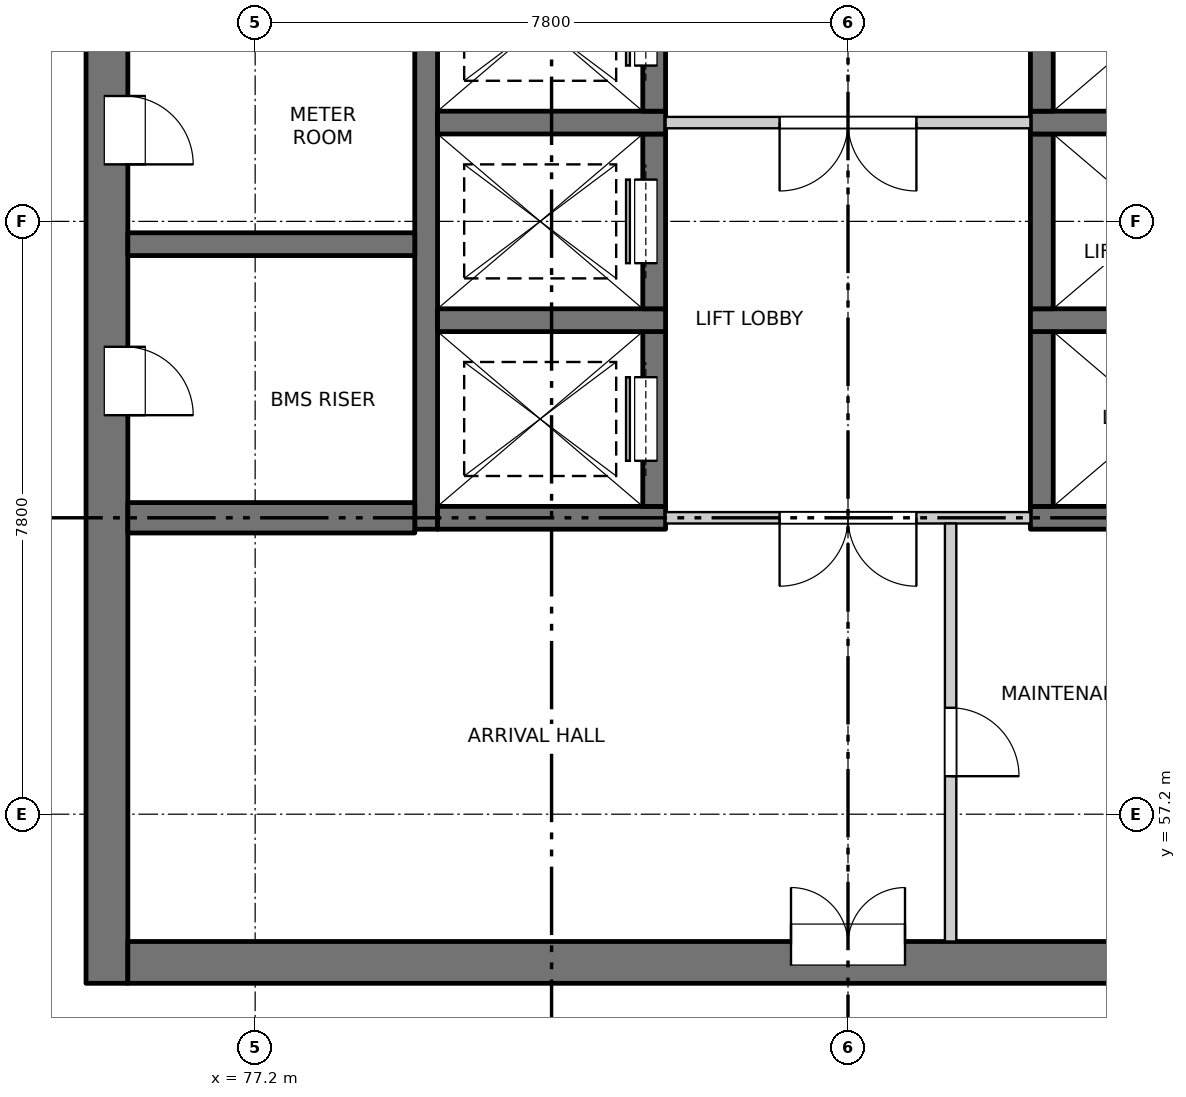
"""IFC4 building model, lengths in metres.
Left out: names, types, materials, properties, quantities, classifications, styles, units other than length and angle.
Written with IfcOpenShell. Run it as: python <this file> out.ifc"""

import sys

from ifc_helpers import new_model, si_unit, direction, frame, frame_2d, origin, place, context, subcontext, project, spatial, rectangle, extrude, element, fill, save


model = new_model("IFC4")
c1 = context("Model", 3, precision=1e-05, world=origin(), true_north=direction((0.0, 1.0)))
c2 = subcontext(c1, "Body", "Model", "MODEL_VIEW")
j1 = project(units=[si_unit("LENGTHUNIT", "METRE"), si_unit("PLANEANGLEUNIT", "RADIAN")], contexts=[c1])
p1 = place(None, origin())
s1 = spatial("IfcSite", under=j1, at=p1, CompositionType="ELEMENT")
p2 = place(p1, origin())
s2 = spatial("IfcBuilding", under=s1, at=p2, CompositionType="ELEMENT")
p3 = place(p2, frame((0.0, 0.0, 127.1)))
s3 = spatial("IfcBuildingStorey", under=s2, at=p3, CompositionType="ELEMENT", Elevation=127.1)
p4 = place(p3, frame((75.25, 54.975, -0.25), z_axis=(0.0, 0.0, 1.0), x_axis=(0.0, 1.0, 0.0)))
e1 = element("IfcWall", 1, at=p4, inside=s3, PredefinedType="SOLIDWALL", context=c2, shape_type="SweptSolid", body=[
    extrude(rectangle(XDim=22.325, YDim=0.55, at=frame_2d((11.163, 0.0))), origin(), (0.0, 0.0, 1.0), 3.4),
])
p5 = place(p4, frame((7.475, 0.0, 0.25)))
e2 = element("IfcOpeningElement", 2, at=p5, cuts=e1, PredefinedType="OPENING", context=c2, shape_type="SweptSolid", body=[
    extrude(rectangle(XDim=0.9, YDim=2.1, at=frame_2d((0.45, 1.05))), frame((0.0, 0.285, 0.0), z_axis=(0.0, -1.0, 0.0), x_axis=(1.0, 0.0, 0.0)), (0.0, 0.0, 1.0), 0.57),
])
p6 = place(p4, frame((10.775, 0.0, 0.25)))
e3 = element("IfcOpeningElement", 3, at=p6, cuts=e1, PredefinedType="OPENING", context=c2, shape_type="SweptSolid", body=[
    extrude(rectangle(XDim=0.9, YDim=2.1, at=frame_2d((0.45, 1.05))), frame((0.0, 0.285, 0.0), z_axis=(0.0, -1.0, 0.0), x_axis=(1.0, 0.0, 0.0)), (0.0, 0.0, 1.0), 0.57),
])
p7 = place(p4, frame((13.775, 0.0, 0.25)))
e4 = element("IfcOpeningElement", 4, at=p7, cuts=e1, PredefinedType="OPENING", context=c2, shape_type="SweptSolid", body=[
    extrude(rectangle(XDim=0.9, YDim=2.1, at=frame_2d((0.45, 1.05))), frame((0.0, 0.285, 0.0), z_axis=(0.0, -1.0, 0.0), x_axis=(1.0, 0.0, 0.0)), (0.0, 0.0, 1.0), 0.57),
])
p8 = place(p4, frame((16.775, 0.0, 0.25)))
e5 = element("IfcOpeningElement", 5, at=p8, cuts=e1, PredefinedType="OPENING", context=c2, shape_type="SweptSolid", body=[
    extrude(rectangle(XDim=0.9, YDim=2.1, at=frame_2d((0.45, 1.05))), frame((0.0, 0.285, 0.0), z_axis=(0.0, -1.0, 0.0), x_axis=(1.0, 0.0, 0.0)), (0.0, 0.0, 1.0), 0.57),
])
p9 = place(p4, frame((20.075, 0.0, 0.25)))
e6 = element("IfcOpeningElement", 6, at=p9, cuts=e1, PredefinedType="OPENING", context=c2, shape_type="SweptSolid", body=[
    extrude(rectangle(XDim=0.9, YDim=2.1, at=frame_2d((0.45, 1.05))), frame((0.0, 0.285, 0.0), z_axis=(0.0, -1.0, 0.0), x_axis=(1.0, 0.0, 0.0)), (0.0, 0.0, 1.0), 0.57),
])
p10 = place(p3, frame((75.525, 55.25, -0.25), z_axis=(0.0, 0.0, 1.0), x_axis=(1.0, 0.0, 0.0)))
e7 = element("IfcWall", 7, at=p10, inside=s3, PredefinedType="SOLIDWALL", context=c2, shape_type="SweptSolid", body=[
    extrude(rectangle(XDim=18.95, YDim=0.55, at=frame_2d((9.475, 0.0))), origin(), (0.0, 0.0, 1.0), 3.4),
])
p11 = place(p10, frame((8.725, 0.0, 0.25)))
e8 = element("IfcOpeningElement", 8, at=p11, cuts=e7, PredefinedType="OPENING", context=c2, shape_type="SweptSolid", body=[
    extrude(rectangle(XDim=1.5, YDim=2.1, at=frame_2d((0.75, 1.05))), frame((0.0, 0.285, 0.0), z_axis=(0.0, -1.0, 0.0), x_axis=(1.0, 0.0, 0.0)), (0.0, 0.0, 1.0), 0.57),
])
p12 = place(p3, frame((79.45, 60.95, -0.25), z_axis=(0.0, 0.0, 1.0), x_axis=(0.0, 1.0, 0.0)))
e9 = element("IfcWall", 9, at=p12, inside=s3, PredefinedType="SOLIDWALL", context=c2, shape_type="SweptSolid", body=[
    extrude(rectangle(XDim=16.35, YDim=0.3, at=frame_2d((8.175, 0.0))), origin(), (0.0, 0.0, 1.0), 3.4),
])
p13 = place(p3, frame((79.6, 61.1, -0.25), z_axis=(0.0, 0.0, 1.0), x_axis=(1.0, 0.0, 0.0)))
e10 = element("IfcWall", 10, at=p13, inside=s3, PredefinedType="SOLIDWALL", context=c2, shape_type="SweptSolid", body=[
    extrude(rectangle(XDim=3.0, YDim=0.3, at=frame_2d((1.5, 0.0))), origin(), (0.0, 0.0, 1.0), 3.4),
])
p14 = place(p3, frame((82.45, 61.25, -0.25), z_axis=(0.0, 0.0, 1.0), x_axis=(0.0, 1.0, 0.0)))
e11 = element("IfcWall", 11, at=p14, inside=s3, PredefinedType="SOLIDWALL", context=c2, shape_type="SweptSolid", body=[
    extrude(rectangle(XDim=2.3, YDim=0.3, at=frame_2d((1.15, 0.0))), origin(), (0.0, 0.0, 1.0), 3.4),
])
p15 = place(p14, frame((0.6, 0.0, 0.25)))
e12 = element("IfcOpeningElement", 12, at=p15, cuts=e11, PredefinedType="OPENING", context=c2, shape_type="SweptSolid", body=[
    extrude(rectangle(XDim=1.1, YDim=2.1, at=frame_2d((0.55, 1.05))), frame((0.0, 0.16, 0.0), z_axis=(0.0, -1.0, 0.0), x_axis=(1.0, 0.0, 0.0)), (0.0, 0.0, 1.0), 0.32),
])
p16 = place(p3, frame((79.6, 63.7, -0.25), z_axis=(0.0, 0.0, 1.0), x_axis=(1.0, 0.0, 0.0)))
e13 = element("IfcWall", 13, at=p16, inside=s3, PredefinedType="SOLIDWALL", context=c2, shape_type="SweptSolid", body=[
    extrude(rectangle(XDim=3.0, YDim=0.3, at=frame_2d((1.5, 0.0))), origin(), (0.0, 0.0, 1.0), 3.4),
])
p17 = place(p3, frame((82.45, 63.85, -0.25), z_axis=(0.0, 0.0, 1.0), x_axis=(0.0, 1.0, 0.0)))
e14 = element("IfcWall", 14, at=p17, inside=s3, PredefinedType="SOLIDWALL", context=c2, shape_type="SweptSolid", body=[
    extrude(rectangle(XDim=2.3, YDim=0.3, at=frame_2d((1.15, 0.0))), origin(), (0.0, 0.0, 1.0), 3.4),
])
p18 = place(p17, frame((0.6, 0.0, 0.25)))
e15 = element("IfcOpeningElement", 15, at=p18, cuts=e14, PredefinedType="OPENING", context=c2, shape_type="SweptSolid", body=[
    extrude(rectangle(XDim=1.1, YDim=2.1, at=frame_2d((0.55, 1.05))), frame((0.0, 0.16, 0.0), z_axis=(0.0, -1.0, 0.0), x_axis=(1.0, 0.0, 0.0)), (0.0, 0.0, 1.0), 0.32),
])
p19 = place(p3, frame((79.6, 66.3, -0.25), z_axis=(0.0, 0.0, 1.0), x_axis=(1.0, 0.0, 0.0)))
e16 = element("IfcWall", 16, at=p19, inside=s3, PredefinedType="SOLIDWALL", context=c2, shape_type="SweptSolid", body=[
    extrude(rectangle(XDim=3.0, YDim=0.3, at=frame_2d((1.5, 0.0))), origin(), (0.0, 0.0, 1.0), 3.4),
])
p20 = place(p3, frame((82.45, 66.45, -0.25), z_axis=(0.0, 0.0, 1.0), x_axis=(0.0, 1.0, 0.0)))
e17 = element("IfcWall", 17, at=p20, inside=s3, PredefinedType="SOLIDWALL", context=c2, shape_type="SweptSolid", body=[
    extrude(rectangle(XDim=2.3, YDim=0.3, at=frame_2d((1.15, 0.0))), origin(), (0.0, 0.0, 1.0), 3.4),
])
p21 = place(p20, frame((0.6, 0.0, 0.25)))
e18 = element("IfcOpeningElement", 18, at=p21, cuts=e17, PredefinedType="OPENING", context=c2, shape_type="SweptSolid", body=[
    extrude(rectangle(XDim=1.1, YDim=2.1, at=frame_2d((0.55, 1.05))), frame((0.0, 0.16, 0.0), z_axis=(0.0, -1.0, 0.0), x_axis=(1.0, 0.0, 0.0)), (0.0, 0.0, 1.0), 0.32),
])
p22 = place(p3, frame((87.4, 61.1, -0.25), z_axis=(0.0, 0.0, 1.0), x_axis=(1.0, 0.0, 0.0)))
e19 = element("IfcWall", 19, at=p22, inside=s3, PredefinedType="SOLIDWALL", context=c2, shape_type="SweptSolid", body=[
    extrude(rectangle(XDim=3.0, YDim=0.3, at=frame_2d((1.5, 0.0))), origin(), (0.0, 0.0, 1.0), 3.4),
])
p23 = place(p3, frame((87.55, 61.25, -0.25), z_axis=(0.0, 0.0, 1.0), x_axis=(0.0, 1.0, 0.0)))
e20 = element("IfcWall", 20, at=p23, inside=s3, PredefinedType="SOLIDWALL", context=c2, shape_type="SweptSolid", body=[
    extrude(rectangle(XDim=2.3, YDim=0.3, at=frame_2d((1.15, 0.0))), origin(), (0.0, 0.0, 1.0), 3.4),
])
p24 = place(p3, frame((87.4, 63.7, -0.25), z_axis=(0.0, 0.0, 1.0), x_axis=(1.0, 0.0, 0.0)))
e21 = element("IfcWall", 21, at=p24, inside=s3, PredefinedType="SOLIDWALL", context=c2, shape_type="SweptSolid", body=[
    extrude(rectangle(XDim=3.0, YDim=0.3, at=frame_2d((1.5, 0.0))), origin(), (0.0, 0.0, 1.0), 3.4),
])
p25 = place(p3, frame((87.55, 63.85, -0.25), z_axis=(0.0, 0.0, 1.0), x_axis=(0.0, 1.0, 0.0)))
e22 = element("IfcWall", 22, at=p25, inside=s3, PredefinedType="SOLIDWALL", context=c2, shape_type="SweptSolid", body=[
    extrude(rectangle(XDim=2.3, YDim=0.3, at=frame_2d((1.15, 0.0))), origin(), (0.0, 0.0, 1.0), 3.4),
])
p26 = place(p3, frame((87.4, 66.3, -0.25), z_axis=(0.0, 0.0, 1.0), x_axis=(1.0, 0.0, 0.0)))
e23 = element("IfcWall", 23, at=p26, inside=s3, PredefinedType="SOLIDWALL", context=c2, shape_type="SweptSolid", body=[
    extrude(rectangle(XDim=3.0, YDim=0.3, at=frame_2d((1.5, 0.0))), origin(), (0.0, 0.0, 1.0), 3.4),
])
p27 = place(p3, frame((87.55, 66.45, -0.25), z_axis=(0.0, 0.0, 1.0), x_axis=(0.0, 1.0, 0.0)))
e24 = element("IfcWall", 24, at=p27, inside=s3, PredefinedType="SOLIDWALL", context=c2, shape_type="SweptSolid", body=[
    extrude(rectangle(XDim=2.3, YDim=0.3, at=frame_2d((1.15, 0.0))), origin(), (0.0, 0.0, 1.0), 3.4),
])
p28 = place(p3, frame((75.525, 61.1, -0.25), z_axis=(0.0, 0.0, 1.0), x_axis=(1.0, 0.0, 0.0)))
e25 = element("IfcWall", 25, at=p28, inside=s3, PredefinedType="SOLIDWALL", context=c2, shape_type="SweptSolid", body=[
    extrude(rectangle(XDim=3.775, YDim=0.4, at=frame_2d((1.888, 0.0))), origin(), (0.0, 0.0, 1.0), 3.4),
])
p29 = place(p3, frame((75.525, 64.7, -0.25), z_axis=(0.0, 0.0, 1.0), x_axis=(1.0, 0.0, 0.0)))
e26 = element("IfcWall", 26, at=p29, inside=s3, PredefinedType="SOLIDWALL", context=c2, shape_type="SweptSolid", body=[
    extrude(rectangle(XDim=3.775, YDim=0.3, at=frame_2d((1.888, 0.0))), origin(), (0.0, 0.0, 1.0), 3.4),
])
p30 = place(p3, frame((82.6, 61.1, 0.0), z_axis=(0.0, 0.0, 1.0), x_axis=(1.0, 0.0, 0.0)))
e27 = element("IfcWall", 27, at=p30, inside=s3, PredefinedType="PARTITIONING", context=c2, shape_type="SweptSolid", body=[
    extrude(rectangle(XDim=4.8, YDim=0.15, at=frame_2d((2.4, 0.0))), origin(), (0.0, 0.0, 1.0), 3.15),
])
p31 = place(p30, frame((1.5, 0.0, 0.0)))
e28 = element("IfcOpeningElement", 28, at=p31, cuts=e27, PredefinedType="OPENING", context=c2, shape_type="SweptSolid", body=[
    extrude(rectangle(XDim=1.8, YDim=2.1, at=frame_2d((0.9, 1.05))), frame((0.0, 0.085, 0.0), z_axis=(0.0, -1.0, 0.0), x_axis=(1.0, 0.0, 0.0)), (0.0, 0.0, 1.0), 0.17),
])
p32 = place(p3, frame((82.6, 66.3, 0.0), z_axis=(0.0, 0.0, 1.0), x_axis=(1.0, 0.0, 0.0)))
e29 = element("IfcWall", 29, at=p32, inside=s3, PredefinedType="PARTITIONING", context=c2, shape_type="SweptSolid", body=[
    extrude(rectangle(XDim=4.8, YDim=0.15, at=frame_2d((2.4, 0.0))), origin(), (0.0, 0.0, 1.0), 3.15),
])
p33 = place(p32, frame((1.5, 0.0, 0.0)))
e30 = element("IfcOpeningElement", 30, at=p33, cuts=e29, PredefinedType="OPENING", context=c2, shape_type="SweptSolid", body=[
    extrude(rectangle(XDim=1.8, YDim=2.1, at=frame_2d((0.9, 1.05))), frame((0.0, 0.085, 0.0), z_axis=(0.0, -1.0, 0.0), x_axis=(1.0, 0.0, 0.0)), (0.0, 0.0, 1.0), 0.17),
])
p34 = place(p3, frame((86.35, 55.525, 0.0), z_axis=(0.0, 0.0, 1.0), x_axis=(0.0, 1.0, 0.0)))
e31 = element("IfcWall", 31, at=p34, inside=s3, PredefinedType="PARTITIONING", context=c2, shape_type="SweptSolid", body=[
    extrude(rectangle(XDim=5.5, YDim=0.15, at=frame_2d((2.75, 0.0))), origin(), (0.0, 0.0, 1.0), 3.15),
])
p35 = place(p34, frame((2.175, 0.0, 0.0)))
e32 = element("IfcOpeningElement", 32, at=p35, cuts=e31, PredefinedType="OPENING", context=c2, shape_type="SweptSolid", body=[
    extrude(rectangle(XDim=0.9, YDim=2.1, at=frame_2d((0.45, 1.05))), frame((0.0, 0.085, 0.0), z_axis=(0.0, -1.0, 0.0), x_axis=(1.0, 0.0, 0.0)), (0.0, 0.0, 1.0), 0.17),
])
p36 = place(p11, origin())
e33 = element("IfcDoor", 33, at=p36, inside=s3, OperationType="DOUBLE_DOOR_SINGLE_SWING", PredefinedType="DOOR", context=c2, shape_type="SweptSolid", body=[
    extrude(rectangle(XDim=1.5, YDim=2.1, at=frame_2d((0.75, 1.05))), frame((0.0, 0.26, 0.0), z_axis=(0.0, -1.0, 0.0), x_axis=(1.0, 0.0, 0.0)), (0.0, 0.0, 1.0), 0.05),
])
fill(e8, e33)
p37 = place(p35, origin())
e34 = element("IfcDoor", 34, at=p37, inside=s3, OperationType="SINGLE_SWING_RIGHT", PredefinedType="DOOR", context=c2, shape_type="SweptSolid", body=[
    extrude(rectangle(XDim=0.9, YDim=2.1, at=frame_2d((0.45, 1.05))), frame((0.0, 0.025, 0.0), z_axis=(0.0, -1.0, 0.0), x_axis=(1.0, 0.0, 0.0)), (0.0, 0.0, 1.0), 0.05),
])
fill(e32, e34)
p38 = place(p31, origin())
e35 = element("IfcDoor", 35, at=p38, inside=s3, OperationType="DOUBLE_DOOR_SINGLE_SWING", PredefinedType="DOOR", context=c2, shape_type="SweptSolid", body=[
    extrude(rectangle(XDim=1.8, YDim=2.1, at=frame_2d((0.9, 1.05))), frame((0.0, 0.025, 0.0), z_axis=(0.0, -1.0, 0.0), x_axis=(1.0, 0.0, 0.0)), (0.0, 0.0, 1.0), 0.05),
])
fill(e28, e35)
p39 = place(p15, origin())
e36 = element("IfcDoor", 36, at=p39, inside=s3, OperationType="SLIDING_TO_RIGHT", PredefinedType="DOOR", context=c2, shape_type="SweptSolid", body=[
    extrude(rectangle(XDim=1.1, YDim=2.1, at=frame_2d((0.55, 1.05))), frame((0.0, 0.135, 0.0), z_axis=(0.0, -1.0, 0.0), x_axis=(1.0, 0.0, 0.0)), (0.0, 0.0, 1.0), 0.05),
])
fill(e12, e36)
p40 = place(p5, origin())
e37 = element("IfcDoor", 37, at=p40, inside=s3, OperationType="SINGLE_SWING_RIGHT", PredefinedType="DOOR", context=c2, shape_type="SweptSolid", body=[
    extrude(rectangle(XDim=0.9, YDim=2.1, at=frame_2d((0.45, 1.05))), frame((0.0, -0.21, 0.0), z_axis=(0.0, -1.0, 0.0), x_axis=(1.0, 0.0, 0.0)), (0.0, 0.0, 1.0), 0.05),
])
fill(e2, e37)
p41 = place(p18, origin())
e38 = element("IfcDoor", 38, at=p41, inside=s3, OperationType="SLIDING_TO_RIGHT", PredefinedType="DOOR", context=c2, shape_type="SweptSolid", body=[
    extrude(rectangle(XDim=1.1, YDim=2.1, at=frame_2d((0.55, 1.05))), frame((0.0, 0.135, 0.0), z_axis=(0.0, -1.0, 0.0), x_axis=(1.0, 0.0, 0.0)), (0.0, 0.0, 1.0), 0.05),
])
fill(e15, e38)
p42 = place(p6, origin())
e39 = element("IfcDoor", 39, at=p42, inside=s3, OperationType="SINGLE_SWING_RIGHT", PredefinedType="DOOR", context=c2, shape_type="SweptSolid", body=[
    extrude(rectangle(XDim=0.9, YDim=2.1, at=frame_2d((0.45, 1.05))), frame((0.0, -0.21, 0.0), z_axis=(0.0, -1.0, 0.0), x_axis=(1.0, 0.0, 0.0)), (0.0, 0.0, 1.0), 0.05),
])
fill(e3, e39)
p43 = place(p33, origin())
e40 = element("IfcDoor", 40, at=p43, inside=s3, OperationType="DOUBLE_DOOR_SINGLE_SWING", PredefinedType="DOOR", context=c2, shape_type="SweptSolid", body=[
    extrude(rectangle(XDim=1.8, YDim=2.1, at=frame_2d((0.9, 1.05))), frame((0.0, 0.025, 0.0), z_axis=(0.0, -1.0, 0.0), x_axis=(1.0, 0.0, 0.0)), (0.0, 0.0, 1.0), 0.05),
])
fill(e30, e40)
p44 = place(p21, origin())
e41 = element("IfcDoor", 41, at=p44, inside=s3, OperationType="SLIDING_TO_RIGHT", PredefinedType="DOOR", context=c2, shape_type="SweptSolid", body=[
    extrude(rectangle(XDim=1.1, YDim=2.1, at=frame_2d((0.55, 1.05))), frame((0.0, 0.135, 0.0), z_axis=(0.0, -1.0, 0.0), x_axis=(1.0, 0.0, 0.0)), (0.0, 0.0, 1.0), 0.05),
])
fill(e18, e41)
save(model, sys.argv[1])
